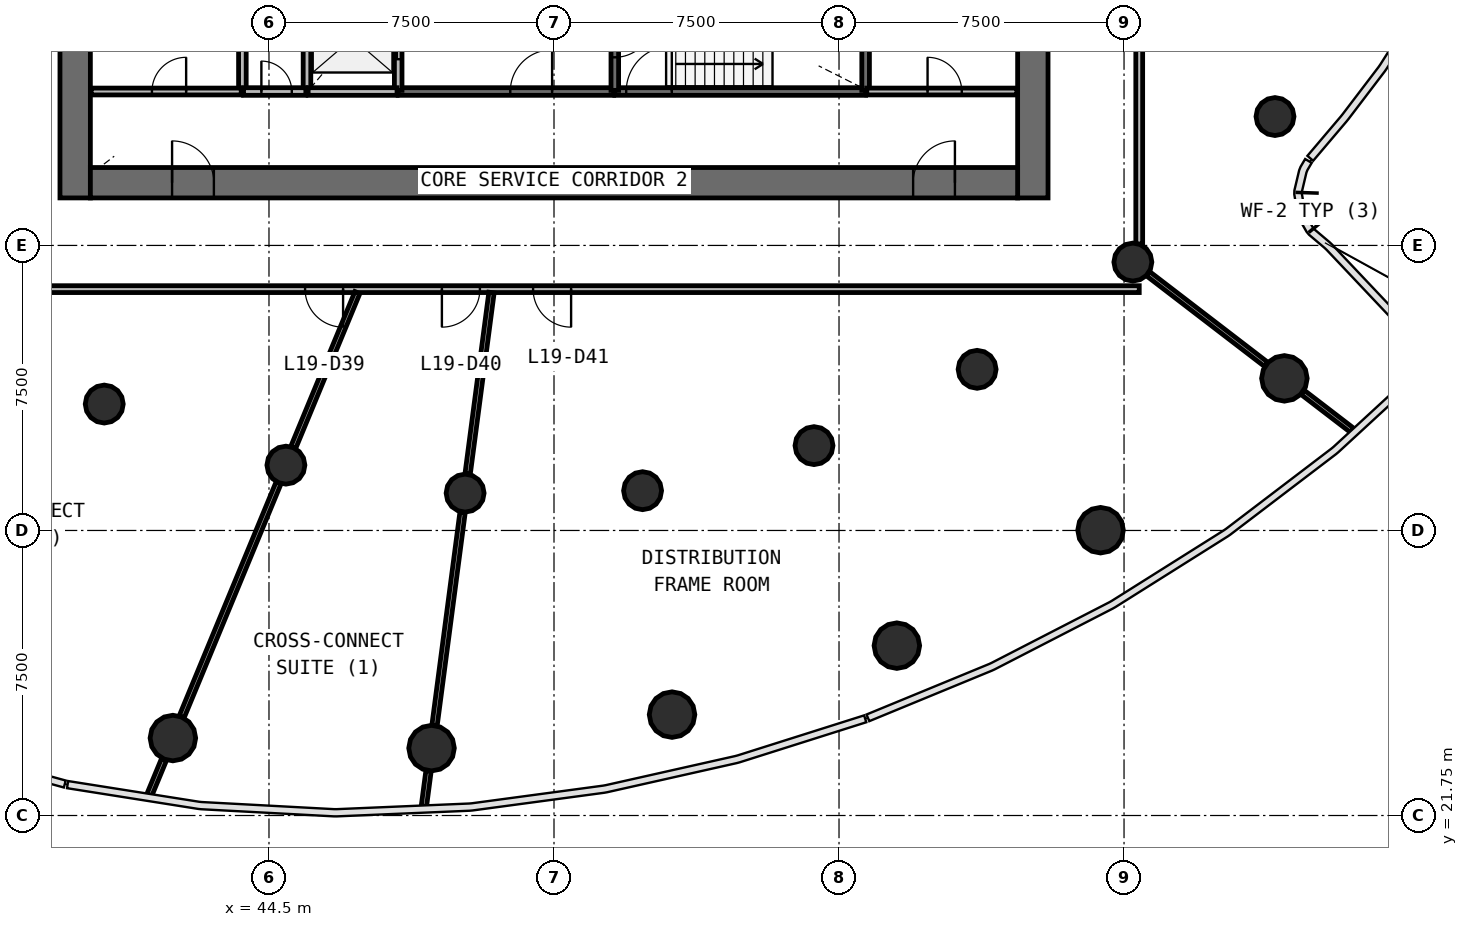
"""IFC4 building model, lengths in metres.
Left out: names, types, materials, properties, quantities, classifications, styles, units other than length and angle.
Written with IfcOpenShell. Run it as: python <this file> out.ifc"""

import sys

from ifc_helpers import new_model, si_unit, direction, frame, frame_2d, origin, origin_2d, place, context, subcontext, project, spatial, rectangle, circle, extrude, source, transform, mapped, element, fill, save


model = new_model("IFC4")
c1 = context("Model", 3, precision=1e-05, world=origin(), true_north=direction((0.0, 1.0)))
c2 = subcontext(c1, "Body", "Model", "MODEL_VIEW")
j1 = project(units=[si_unit("LENGTHUNIT", "METRE"), si_unit("PLANEANGLEUNIT", "RADIAN")], contexts=[c1])
p1 = place(None, origin())
s1 = spatial("IfcSite", under=j1, at=p1, CompositionType="ELEMENT")
p2 = place(p1, origin())
s2 = spatial("IfcBuilding", under=s1, at=p2, CompositionType="ELEMENT")
p3 = place(p2, frame((0.0, 0.0, 83.9)))
s3 = spatial("IfcBuildingStorey", under=s2, at=p3, CompositionType="ELEMENT", Elevation=83.9)
p4 = place(p3, frame((64.6, 38.0, 0.0), z_axis=(0.0, 0.0, 1.0), x_axis=(0.0, 1.0, 0.0)))
e1 = element("IfcWall", 1, at=p4, inside=s3, PredefinedType="SHEAR", context=c2, shape_type="SweptSolid", body=[
    extrude(rectangle(XDim=20.0, YDim=0.8, at=frame_2d((10.0, 0.0))), origin(), (0.0, 0.0, 1.0), 4.1),
])
p5 = place(p4, frame((9.1, 0.0, 0.0)))
e2 = element("IfcOpeningElement", 2, at=p5, cuts=e1, PredefinedType="OPENING", context=c2, shape_type="SweptSolid", body=[
    extrude(rectangle(XDim=1.8, YDim=2.1, at=frame_2d((0.9, 1.05))), frame((0.0, 0.41, 0.0), z_axis=(0.0, -1.0, 0.0), x_axis=(1.0, 0.0, 0.0)), (0.0, 0.0, 1.0), 0.82),
])
p6 = place(p3, frame((39.4, 58.0, 0.0), z_axis=(0.0, 0.0, 1.0), x_axis=(0.0, -1.0, 0.0)))
e3 = element("IfcWall", 3, at=p6, inside=s3, PredefinedType="SHEAR", context=c2, shape_type="SweptSolid", body=[
    extrude(rectangle(XDim=20.0, YDim=0.8, at=frame_2d((10.0, 0.0))), origin(), (0.0, 0.0, 1.0), 4.1),
])
p7 = place(p6, frame((9.1, 0.0, 0.0)))
e4 = element("IfcOpeningElement", 4, at=p7, cuts=e3, PredefinedType="OPENING", context=c2, shape_type="SweptSolid", body=[
    extrude(rectangle(XDim=1.8, YDim=2.1, at=frame_2d((0.9, 1.05))), frame((0.0, 0.41, 0.0), z_axis=(0.0, -1.0, 0.0), x_axis=(1.0, 0.0, 0.0)), (0.0, 0.0, 1.0), 0.82),
])
p8 = place(p3, frame((39.8, 38.4, 0.0), z_axis=(0.0, 0.0, 1.0), x_axis=(1.0, 0.0, 0.0)))
e5 = element("IfcWall", 5, at=p8, inside=s3, PredefinedType="SHEAR", context=c2, shape_type="SweptSolid", body=[
    extrude(rectangle(XDim=24.4, YDim=0.8, at=frame_2d((12.2, 0.0))), origin(), (0.0, 0.0, 1.0), 4.1),
])
p9 = place(p8, frame((21.65, 0.0, 0.0)))
e6 = element("IfcOpeningElement", 6, at=p9, cuts=e5, PredefinedType="OPENING", context=c2, shape_type="SweptSolid", body=[
    extrude(rectangle(XDim=1.1, YDim=2.1, at=frame_2d((0.55, 1.05))), frame((0.0, 0.41, 0.0), z_axis=(0.0, -1.0, 0.0), x_axis=(1.0, 0.0, 0.0)), (0.0, 0.0, 1.0), 0.82),
])
p10 = place(p8, frame((2.15, 0.0, 0.0)))
e7 = element("IfcOpeningElement", 7, at=p10, cuts=e5, PredefinedType="OPENING", context=c2, shape_type="SweptSolid", body=[
    extrude(rectangle(XDim=1.1, YDim=2.1, at=frame_2d((0.55, 1.05))), frame((0.0, 0.41, 0.0), z_axis=(0.0, -1.0, 0.0), x_axis=(1.0, 0.0, 0.0)), (0.0, 0.0, 1.0), 0.82),
])
m1 = source(origin(), c2, "Body", "SweptSolid", [
    extrude(circle(Radius=0.6, at=origin_2d()), origin(), (0.0, 0.0, 1.0), 4.1),
])
for number, where, z_axis, x_axis in (
    (8, (41.971, 23.788, 0.0), (0.0, 0.0, 1.0), (1.0, 0.0, 0.0)),
    (9, (48.778, 23.523, 0.0), (0.0, 0.0, 1.0), (1.0, 0.0, 0.0)),
    (10, (55.106, 24.405, 0.0), (0.0, 0.0, 1.0), (1.0, 0.0, 0.0)),
    (11, (61.022, 26.219, 0.0), (0.0, 0.0, 1.0), (1.0, 0.0, 0.0)),
    (12, (66.382, 29.257, 0.0), (0.0, 0.0, 1.0), (1.0, 0.0, 0.0)),
    (13, (71.22, 33.252, 0.0), (0.0, 0.0, 1.0), (1.0, 0.0, 0.0)),
):
    element("IfcColumn", number, at=place(p3, frame(where, z_axis=z_axis, x_axis=x_axis)), inside=s3, PredefinedType="COLUMN", context=c2, shape_type="MappedRepresentation", body=[
        mapped(m1, transform((0.0, 0.0, 0.0), scale=1.0)),
    ])
m2 = source(origin(), c2, "Body", "SweptSolid", [
    extrude(circle(Radius=0.5, at=origin_2d()), origin(), (0.0, 0.0, 1.0), 4.1),
])
for number, where, z_axis, x_axis in (
    (14, (40.165, 32.576, 0.0), (0.0, 0.0, 1.0), (1.0, 0.0, 0.0)),
    (15, (44.945, 30.969, 0.0), (0.0, 0.0, 1.0), (1.0, 0.0, 0.0)),
    (16, (49.661, 30.233, 0.0), (0.0, 0.0, 1.0), (1.0, 0.0, 0.0)),
    (17, (54.331, 30.297, 0.0), (0.0, 0.0, 1.0), (1.0, 0.0, 0.0)),
    (18, (58.842, 31.482, 0.0), (0.0, 0.0, 1.0), (1.0, 0.0, 0.0)),
    (19, (63.134, 33.49, 0.0), (0.0, 0.0, 1.0), (1.0, 0.0, 0.0)),
    (20, (67.232, 36.312, 0.0), (0.0, 0.0, 1.0), (1.0, 0.0, 0.0)),
    (21, (70.972, 40.141, 0.0), (0.0, 0.0, 1.0), (1.0, 0.0, 0.0)),
):
    element("IfcColumn", number, at=place(p3, frame(where, z_axis=z_axis, x_axis=x_axis)), inside=s3, PredefinedType="COLUMN", context=c2, shape_type="MappedRepresentation", body=[
        mapped(m2, transform((0.0, 0.0, 0.0), scale=1.0)),
    ])
p11 = place(p3, frame((53.6, 40.8, 0.0), z_axis=(0.0, 0.0, 1.0), x_axis=(1.0, 0.0, 0.0)))
e22 = element("IfcWall", 22, at=p11, inside=s3, PredefinedType="SOLIDWALL", context=c2, shape_type="SweptSolid", body=[
    extrude(rectangle(XDim=6.6, YDim=0.2, at=frame_2d((3.3, 0.0))), origin(), (0.0, 0.0, 1.0), 3.7),
])
p12 = place(p11, frame((0.3, 0.0, 0.0)))
e23 = element("IfcOpeningElement", 23, at=p12, cuts=e22, PredefinedType="OPENING", context=c2, shape_type="SweptSolid", body=[
    extrude(rectangle(XDim=1.2, YDim=2.1, at=frame_2d((0.6, 1.05))), frame((0.0, 0.11, 0.0), z_axis=(0.0, -1.0, 0.0), x_axis=(1.0, 0.0, 0.0)), (0.0, 0.0, 1.0), 0.22),
])
p13 = place(p3, frame((47.9, 40.8, 0.0), z_axis=(0.0, 0.0, 1.0), x_axis=(1.0, 0.0, 0.0)))
e24 = element("IfcWall", 24, at=p13, inside=s3, PredefinedType="SOLIDWALL", context=c2, shape_type="SweptSolid", body=[
    extrude(rectangle(XDim=5.67, YDim=0.2, at=frame_2d((2.835, 0.0))), origin(), (0.0, 0.0, 1.0), 3.7),
])
p14 = place(p13, frame((2.95, 0.0, 0.0)))
e25 = element("IfcOpeningElement", 25, at=p14, cuts=e24, PredefinedType="OPENING", context=c2, shape_type="SweptSolid", body=[
    extrude(rectangle(XDim=1.1, YDim=2.1, at=frame_2d((0.55, 1.05))), frame((0.0, 0.11, 0.0), z_axis=(0.0, -1.0, 0.0), x_axis=(1.0, 0.0, 0.0)), (0.0, 0.0, 1.0), 0.22),
])
for number, where, z_axis, x_axis in (
    (26, (43.8, 43.6, 0.0), (0.0, 0.0, 1.0), (0.0, -1.0, 0.0)),
    (27, (45.5, 43.6, 0.0), (0.0, 0.0, 1.0), (0.0, -1.0, 0.0)),
):
    element("IfcWall", number, at=place(p3, frame(where, z_axis=z_axis, x_axis=x_axis)), inside=s3, PredefinedType="SOLIDWALL", context=c2, shape_type="SweptSolid", body=[
        extrude(rectangle(XDim=2.8, YDim=0.2, at=frame_2d((1.4, 0.0))), origin(), (0.0, 0.0, 1.0), 3.7),
    ])
p15 = place(p3, frame((47.9, 40.83, 0.0), z_axis=(0.0, 0.0, 1.0), x_axis=(0.0, 1.0, 0.0)))
e28 = element("IfcWall", 28, at=p15, inside=s3, PredefinedType="SOLIDWALL", context=c2, shape_type="SweptSolid", body=[
    extrude(rectangle(XDim=2.77, YDim=0.2, at=frame_2d((1.385, 0.0))), origin(), (0.0, 0.0, 1.0), 3.7),
])
p16 = place(p15, frame((0.82, 0.0, 0.0)))
e29 = element("IfcOpeningElement", 29, at=p16, cuts=e28, PredefinedType="OPENING", context=c2, shape_type="SweptSolid", body=[
    extrude(rectangle(XDim=1.1, YDim=2.1, at=frame_2d((0.55, 1.05))), frame((0.0, 0.11, 0.0), z_axis=(0.0, -1.0, 0.0), x_axis=(1.0, 0.0, 0.0)), (0.0, 0.0, 1.0), 0.22),
])
p17 = place(p3, frame((60.2, 40.83, 0.0), z_axis=(0.0, 0.0, 1.0), x_axis=(0.0, 1.0, 0.0)))
e30 = element("IfcWall", 30, at=p17, inside=s3, PredefinedType="SOLIDWALL", context=c2, shape_type="SweptSolid", body=[
    extrude(rectangle(XDim=2.77, YDim=0.2, at=frame_2d((1.385, 0.0))), origin(), (0.0, 0.0, 1.0), 3.7),
])
p18 = place(p3, frame((53.6, 43.6, 0.0), z_axis=(0.0, 0.0, 1.0), x_axis=(0.0, -1.0, 0.0)))
e31 = element("IfcWall", 31, at=p18, inside=s3, PredefinedType="SOLIDWALL", context=c2, shape_type="SweptSolid", body=[
    extrude(rectangle(XDim=2.77, YDim=0.2, at=frame_2d((1.385, 0.0))), origin(), (0.0, 0.0, 1.0), 3.7),
])
p19 = place(p18, frame((0.9, 0.0, 0.0)))
e32 = element("IfcOpeningElement", 32, at=p19, cuts=e31, PredefinedType="OPENING", context=c2, shape_type="SweptSolid", body=[
    extrude(rectangle(XDim=1.0, YDim=2.1, at=frame_2d((0.5, 1.05))), frame((0.0, 0.11, 0.0), z_axis=(0.0, -1.0, 0.0), x_axis=(1.0, 0.0, 0.0)), (0.0, 0.0, 1.0), 0.22),
])
p20 = place(p3, frame((45.53, 40.8, 0.0), z_axis=(0.0, 0.0, 1.0), x_axis=(1.0, 0.0, 0.0)))
e33 = element("IfcWall", 33, at=p20, inside=s3, PredefinedType="SOLIDWALL", context=c2, shape_type="SweptSolid", body=[
    extrude(rectangle(XDim=2.34, YDim=0.2, at=frame_2d((1.17, 0.0))), origin(), (0.0, 0.0, 1.0), 3.7),
])
p21 = place(p3, frame((43.83, 40.8, 0.0), z_axis=(0.0, 0.0, 1.0), x_axis=(1.0, 0.0, 0.0)))
e34 = element("IfcWall", 34, at=p21, inside=s3, PredefinedType="SOLIDWALL", context=c2, shape_type="SweptSolid", body=[
    extrude(rectangle(XDim=1.64, YDim=0.2, at=frame_2d((0.82, 0.0))), origin(), (0.0, 0.0, 1.0), 3.7),
])
p22 = place(p21, frame((0.47, 0.0, 0.0)))
e35 = element("IfcOpeningElement", 35, at=p22, cuts=e34, PredefinedType="OPENING", context=c2, shape_type="SweptSolid", body=[
    extrude(rectangle(XDim=0.8, YDim=2.1, at=frame_2d((0.4, 1.05))), frame((0.0, 0.11, 0.0), z_axis=(0.0, -1.0, 0.0), x_axis=(1.0, 0.0, 0.0)), (0.0, 0.0, 1.0), 0.22),
])
p23 = place(p3, frame((67.4, 35.6, 0.0), z_axis=(0.0, 0.0, 1.0), x_axis=(-1.0, 0.0, 0.0)))
e36 = element("IfcWall", 36, at=p23, inside=s3, PredefinedType="PARTITIONING", context=c2, shape_type="SweptSolid", body=[
    extrude(rectangle(XDim=30.8, YDim=0.18, at=frame_2d((15.4, 0.0))), origin(), (0.0, 0.0, 1.0), 2.9),
])
p24 = place(p23, frame((20.95, 0.0, 0.0)))
e37 = element("IfcOpeningElement", 37, at=p24, cuts=e36, PredefinedType="OPENING", context=c2, shape_type="SweptSolid", body=[
    extrude(rectangle(XDim=1.0, YDim=2.1, at=frame_2d((0.5, 1.05))), frame((0.0, 0.1, 0.0), z_axis=(0.0, -1.0, 0.0), x_axis=(1.0, 0.0, 0.0)), (0.0, 0.0, 1.0), 0.2),
])
p25 = place(p23, frame((17.35, 0.0, 0.0)))
e38 = element("IfcOpeningElement", 38, at=p25, cuts=e36, PredefinedType="OPENING", context=c2, shape_type="SweptSolid", body=[
    extrude(rectangle(XDim=1.0, YDim=2.1, at=frame_2d((0.5, 1.05))), frame((0.0, 0.1, 0.0), z_axis=(0.0, -1.0, 0.0), x_axis=(1.0, 0.0, 0.0)), (0.0, 0.0, 1.0), 0.2),
])
p26 = place(p23, frame((14.95, 0.0, 0.0)))
e39 = element("IfcOpeningElement", 39, at=p26, cuts=e36, PredefinedType="OPENING", context=c2, shape_type="SweptSolid", body=[
    extrude(rectangle(XDim=1.0, YDim=2.1, at=frame_2d((0.5, 1.05))), frame((0.0, 0.1, 0.0), z_axis=(0.0, -1.0, 0.0), x_axis=(1.0, 0.0, 0.0)), (0.0, 0.0, 1.0), 0.2),
])
p27 = place(p3, frame((67.4, 60.37, 0.0), z_axis=(0.0, 0.0, 1.0), x_axis=(0.0, -1.0, 0.0)))
e40 = element("IfcWall", 40, at=p27, inside=s3, PredefinedType="PARTITIONING", context=c2, shape_type="SweptSolid", body=[
    extrude(rectangle(XDim=23.583, YDim=0.18, at=frame_2d((11.791, 0.0))), origin(), (0.0, 0.0, 1.0), 2.9),
])
p28 = place(p27, frame((9.133, 0.0, 0.0)))
e41 = element("IfcOpeningElement", 41, at=p28, cuts=e40, PredefinedType="OPENING", context=c2, shape_type="SweptSolid", body=[
    extrude(rectangle(XDim=1.0, YDim=2.1, at=frame_2d((0.5, 1.05))), frame((0.0, 0.1, 0.0), z_axis=(0.0, -1.0, 0.0), x_axis=(1.0, 0.0, 0.0)), (0.0, 0.0, 1.0), 0.2),
])
p29 = place(p27, frame((11.333, 0.0, 0.0)))
e42 = element("IfcOpeningElement", 42, at=p29, cuts=e40, PredefinedType="OPENING", context=c2, shape_type="SweptSolid", body=[
    extrude(rectangle(XDim=1.0, YDim=2.1, at=frame_2d((0.5, 1.05))), frame((0.0, 0.1, 0.0), z_axis=(0.0, -1.0, 0.0), x_axis=(1.0, 0.0, 0.0)), (0.0, 0.0, 1.0), 0.2),
])
p30 = place(p3, frame((60.23, 40.8, 0.0), z_axis=(0.0, 0.0, 1.0), x_axis=(1.0, 0.0, 0.0)))
e43 = element("IfcWall", 43, at=p30, inside=s3, PredefinedType="PARTITIONING", context=c2, shape_type="SweptSolid", body=[
    extrude(rectangle(XDim=3.95, YDim=0.18, at=frame_2d((1.975, 0.0))), origin(), (0.0, 0.0, 1.0), 3.7),
])
p31 = place(p30, frame((1.6, 0.0, 0.0)))
e44 = element("IfcOpeningElement", 44, at=p31, cuts=e43, PredefinedType="OPENING", context=c2, shape_type="SweptSolid", body=[
    extrude(rectangle(XDim=0.9, YDim=2.1, at=frame_2d((0.45, 1.05))), frame((0.0, 0.1, 0.0), z_axis=(0.0, -1.0, 0.0), x_axis=(1.0, 0.0, 0.0)), (0.0, 0.0, 1.0), 0.2),
])
p32 = place(p3, frame((39.82, 40.8, 0.0), z_axis=(0.0, 0.0, 1.0), x_axis=(1.0, 0.0, 0.0)))
e45 = element("IfcWall", 45, at=p32, inside=s3, PredefinedType="PARTITIONING", context=c2, shape_type="SweptSolid", body=[
    extrude(rectangle(XDim=3.95, YDim=0.18, at=frame_2d((1.975, 0.0))), origin(), (0.0, 0.0, 1.0), 3.7),
])
p33 = place(p32, frame((1.6, 0.0, 0.0)))
e46 = element("IfcOpeningElement", 46, at=p33, cuts=e45, PredefinedType="OPENING", context=c2, shape_type="SweptSolid", body=[
    extrude(rectangle(XDim=0.9, YDim=2.1, at=frame_2d((0.45, 1.05))), frame((0.0, 0.1, 0.0), z_axis=(0.0, -1.0, 0.0), x_axis=(1.0, 0.0, 0.0)), (0.0, 0.0, 1.0), 0.2),
])
p34 = place(p3, frame((44.752, 30.502, 0.0), z_axis=(0.0, 0.0, 1.0), x_axis=(-0.382696989205, -0.923873916968, 0.0)))
e47 = element("IfcWall", 47, at=p34, inside=s3, PredefinedType="PARTITIONING", context=c2, shape_type="SweptSolid", body=[
    extrude(rectangle(XDim=6.663, YDim=0.14, at=frame_2d((3.332, 0.0))), origin(), (0.0, 0.0, 1.0), 2.9),
])
p35 = place(p3, frame((49.595, 29.733, 0.0), z_axis=(0.0, 0.0, 1.0), x_axis=(-0.130510314557, -0.991446951578, 0.0)))
e48 = element("IfcWall", 48, at=p35, inside=s3, PredefinedType="PARTITIONING", context=c2, shape_type="SweptSolid", body=[
    extrude(rectangle(XDim=5.659, YDim=0.14, at=frame_2d((2.829, 0.0))), origin(), (0.0, 0.0, 1.0), 2.9),
])
p36 = place(p3, frame((50.356, 35.51, 0.0), z_axis=(0.0, 0.0, 1.0), x_axis=(-0.130523979823, -0.991445152639, 0.0)))
e49 = element("IfcWall", 49, at=p36, inside=s3, PredefinedType="PARTITIONING", context=c2, shape_type="SweptSolid", body=[
    extrude(rectangle(XDim=4.818, YDim=0.14, at=frame_2d((2.409, 0.0))), origin(), (0.0, 0.0, 1.0), 2.9),
])
p37 = place(p3, frame((46.826, 35.51, 0.0), z_axis=(0.0, 0.0, 1.0), x_axis=(-0.382672831764, -0.923883923353, 0.0)))
e50 = element("IfcWall", 50, at=p37, inside=s3, PredefinedType="PARTITIONING", context=c2, shape_type="SweptSolid", body=[
    extrude(rectangle(XDim=4.41, YDim=0.14, at=frame_2d((2.205, 0.0))), origin(), (0.0, 0.0, 1.0), 2.9),
])
p38 = place(p3, frame((67.633, 36.005, 0.0), z_axis=(0.0, 0.0, 1.0), x_axis=(0.793362528146, -0.608749454977, 0.0)))
e51 = element("IfcWall", 51, at=p38, inside=s3, PredefinedType="PARTITIONING", context=c2, shape_type="SweptSolid", body=[
    extrude(rectangle(XDim=3.917, YDim=0.14, at=frame_2d((1.958, 0.0))), origin(), (0.0, 0.0, 1.0), 2.9),
])
p39 = place(p3, frame((71.699, 32.884, 0.0), z_axis=(0.0, 0.0, 1.0), x_axis=(0.793364464168, -0.608746931816, 0.0)))
e52 = element("IfcWall", 52, at=p39, inside=s3, PredefinedType="PARTITIONING", context=c2, shape_type="SweptSolid", body=[
    extrude(rectangle(XDim=1.641, YDim=0.14, at=frame_2d((0.821, 0.0))), origin(), (0.0, 0.0, 1.0), 2.9),
])
p40 = place(p3, frame((41.74, 23.229, 0.0), z_axis=(0.0, 0.0, 1.0), x_axis=(-0.382620326534, -0.923905669278, 0.0)))
e53 = element("IfcWall", 53, at=p40, inside=s3, PredefinedType="PARTITIONING", context=c2, shape_type="SweptSolid", body=[
    extrude(rectangle(XDim=1.017, YDim=0.14, at=frame_2d((0.509, 0.0))), origin(), (0.0, 0.0, 1.0), 2.9),
])
p41 = place(p3, frame((48.699, 22.924, 0.0), z_axis=(0.0, 0.0, 1.0), x_axis=(-0.130494858673, -0.99144898601, 0.0)))
e54 = element("IfcWall", 54, at=p41, inside=s3, PredefinedType="PARTITIONING", context=c2, shape_type="SweptSolid", body=[
    extrude(rectangle(XDim=0.939, YDim=0.14, at=frame_2d((0.47, 0.0))), origin(), (0.0, 0.0, 1.0), 2.9),
])
m3 = source(origin(), c2, "Body", "SweptSolid", [
    extrude(rectangle(XDim=1.1, YDim=2.1, at=frame_2d((0.55, 1.05))), frame((0.0, 0.025, 0.0), z_axis=(0.0, -1.0, 0.0), x_axis=(1.0, 0.0, 0.0)), (0.0, 0.0, 1.0), 0.05),
])
p42 = place(p16, origin())
e55 = element("IfcDoor", 55, at=p42, inside=s3, OperationType="DOUBLE_DOOR_SLIDING", PredefinedType="USERDEFINED", context=c2, shape_type="MappedRepresentation", body=[
    mapped(m3, transform((0.0, 0.0, 0.0), scale=1.0)),
])
fill(e29, e55)
m4 = source(origin(), c2, "Body", "SweptSolid", [
    extrude(rectangle(XDim=1.2, YDim=2.1, at=frame_2d((0.6, 1.05))), frame((0.0, 0.025, 0.0), z_axis=(0.0, -1.0, 0.0), x_axis=(1.0, 0.0, 0.0)), (0.0, 0.0, 1.0), 0.05),
])
p43 = place(p12, origin())
e56 = element("IfcDoor", 56, at=p43, inside=s3, OperationType="SINGLE_SWING_RIGHT", PredefinedType="DOOR", context=c2, shape_type="MappedRepresentation", body=[
    mapped(m4, transform((0.0, 0.0, 0.0), scale=1.0)),
])
fill(e23, e56)
m5 = source(origin(), c2, "Body", "SweptSolid", [
    extrude(rectangle(XDim=1.0, YDim=2.1, at=frame_2d((0.5, 1.05))), frame((0.0, 0.025, 0.0), z_axis=(0.0, -1.0, 0.0), x_axis=(1.0, 0.0, 0.0)), (0.0, 0.0, 1.0), 0.05),
])
p44 = place(p19, origin())
e57 = element("IfcDoor", 57, at=p44, inside=s3, OperationType="SINGLE_SWING_LEFT", PredefinedType="DOOR", context=c2, shape_type="MappedRepresentation", body=[
    mapped(m5, transform((0.0, 0.0, 0.0), scale=1.0)),
])
fill(e32, e57)
m6 = source(origin(), c2, "Body", "SweptSolid", [
    extrude(rectangle(XDim=1.1, YDim=2.1, at=frame_2d((0.55, 1.05))), frame((0.0, 0.025, 0.0), z_axis=(0.0, -1.0, 0.0), x_axis=(1.0, 0.0, 0.0)), (0.0, 0.0, 1.0), 0.05),
])
p45 = place(p14, origin())
e58 = element("IfcDoor", 58, at=p45, inside=s3, OperationType="SINGLE_SWING_RIGHT", PredefinedType="DOOR", context=c2, shape_type="MappedRepresentation", body=[
    mapped(m6, transform((0.0, 0.0, 0.0), scale=1.0)),
])
fill(e25, e58)
m7 = source(origin(), c2, "Body", "SweptSolid", [
    extrude(rectangle(XDim=0.8, YDim=2.1, at=frame_2d((0.4, 1.05))), frame((0.0, 0.025, 0.0), z_axis=(0.0, -1.0, 0.0), x_axis=(1.0, 0.0, 0.0)), (0.0, 0.0, 1.0), 0.05),
])
p46 = place(p22, origin())
e59 = element("IfcDoor", 59, at=p46, inside=s3, OperationType="SINGLE_SWING_LEFT", PredefinedType="DOOR", context=c2, shape_type="MappedRepresentation", body=[
    mapped(m7, transform((0.0, 0.0, 0.0), scale=1.0)),
])
fill(e35, e59)
m8 = source(origin(), c2, "Body", "SweptSolid", [
    extrude(rectangle(XDim=1.1, YDim=2.1, at=frame_2d((0.55, 1.05))), frame((0.0, 0.025, 0.0), z_axis=(0.0, -1.0, 0.0), x_axis=(1.0, 0.0, 0.0)), (0.0, 0.0, 1.0), 0.05),
])
p47 = place(p9, origin())
e60 = element("IfcDoor", 60, at=p47, inside=s3, OperationType="SINGLE_SWING_RIGHT", PredefinedType="DOOR", context=c2, shape_type="MappedRepresentation", body=[
    mapped(m8, transform((0.0, 0.0, 0.0), scale=1.0)),
])
fill(e6, e60)
p48 = place(p10, origin())
e61 = element("IfcDoor", 61, at=p48, inside=s3, OperationType="SINGLE_SWING_LEFT", PredefinedType="DOOR", context=c2, shape_type="MappedRepresentation", body=[
    mapped(m8, transform((0.0, 0.0, 0.0), scale=1.0)),
])
fill(e7, e61)
m9 = source(origin(), c2, "Body", "SweptSolid", [
    extrude(rectangle(XDim=1.0, YDim=2.1, at=frame_2d((0.5, 1.05))), frame((0.0, 0.025, 0.0), z_axis=(0.0, -1.0, 0.0), x_axis=(1.0, 0.0, 0.0)), (0.0, 0.0, 1.0), 0.05),
])
p49 = place(p24, origin())
e62 = element("IfcDoor", 62, at=p49, inside=s3, OperationType="SINGLE_SWING_LEFT", PredefinedType="DOOR", context=c2, shape_type="MappedRepresentation", body=[
    mapped(m9, transform((0.0, 0.0, 0.0), scale=1.0)),
])
fill(e37, e62)
p50 = place(p25, origin())
e63 = element("IfcDoor", 63, at=p50, inside=s3, OperationType="SINGLE_SWING_RIGHT", PredefinedType="DOOR", context=c2, shape_type="MappedRepresentation", body=[
    mapped(m9, transform((0.0, 0.0, 0.0), scale=1.0)),
])
fill(e38, e63)
p51 = place(p26, origin())
e64 = element("IfcDoor", 64, at=p51, inside=s3, OperationType="SINGLE_SWING_LEFT", PredefinedType="DOOR", context=c2, shape_type="MappedRepresentation", body=[
    mapped(m9, transform((0.0, 0.0, 0.0), scale=1.0)),
])
fill(e39, e64)
m10 = source(origin(), c2, "Body", "SweptSolid", [
    extrude(rectangle(XDim=0.9, YDim=2.1, at=frame_2d((0.45, 1.05))), frame((0.0, 0.025, 0.0), z_axis=(0.0, -1.0, 0.0), x_axis=(1.0, 0.0, 0.0)), (0.0, 0.0, 1.0), 0.05),
])
p52 = place(p33, origin())
e65 = element("IfcDoor", 65, at=p52, inside=s3, OperationType="SINGLE_SWING_RIGHT", PredefinedType="DOOR", context=c2, shape_type="MappedRepresentation", body=[
    mapped(m10, transform((0.0, 0.0, 0.0), scale=1.0)),
])
fill(e46, e65)
p53 = place(p31, origin())
e66 = element("IfcDoor", 66, at=p53, inside=s3, OperationType="SINGLE_SWING_LEFT", PredefinedType="DOOR", context=c2, shape_type="MappedRepresentation", body=[
    mapped(m10, transform((0.0, 0.0, 0.0), scale=1.0)),
])
fill(e44, e66)
save(model, sys.argv[1])
